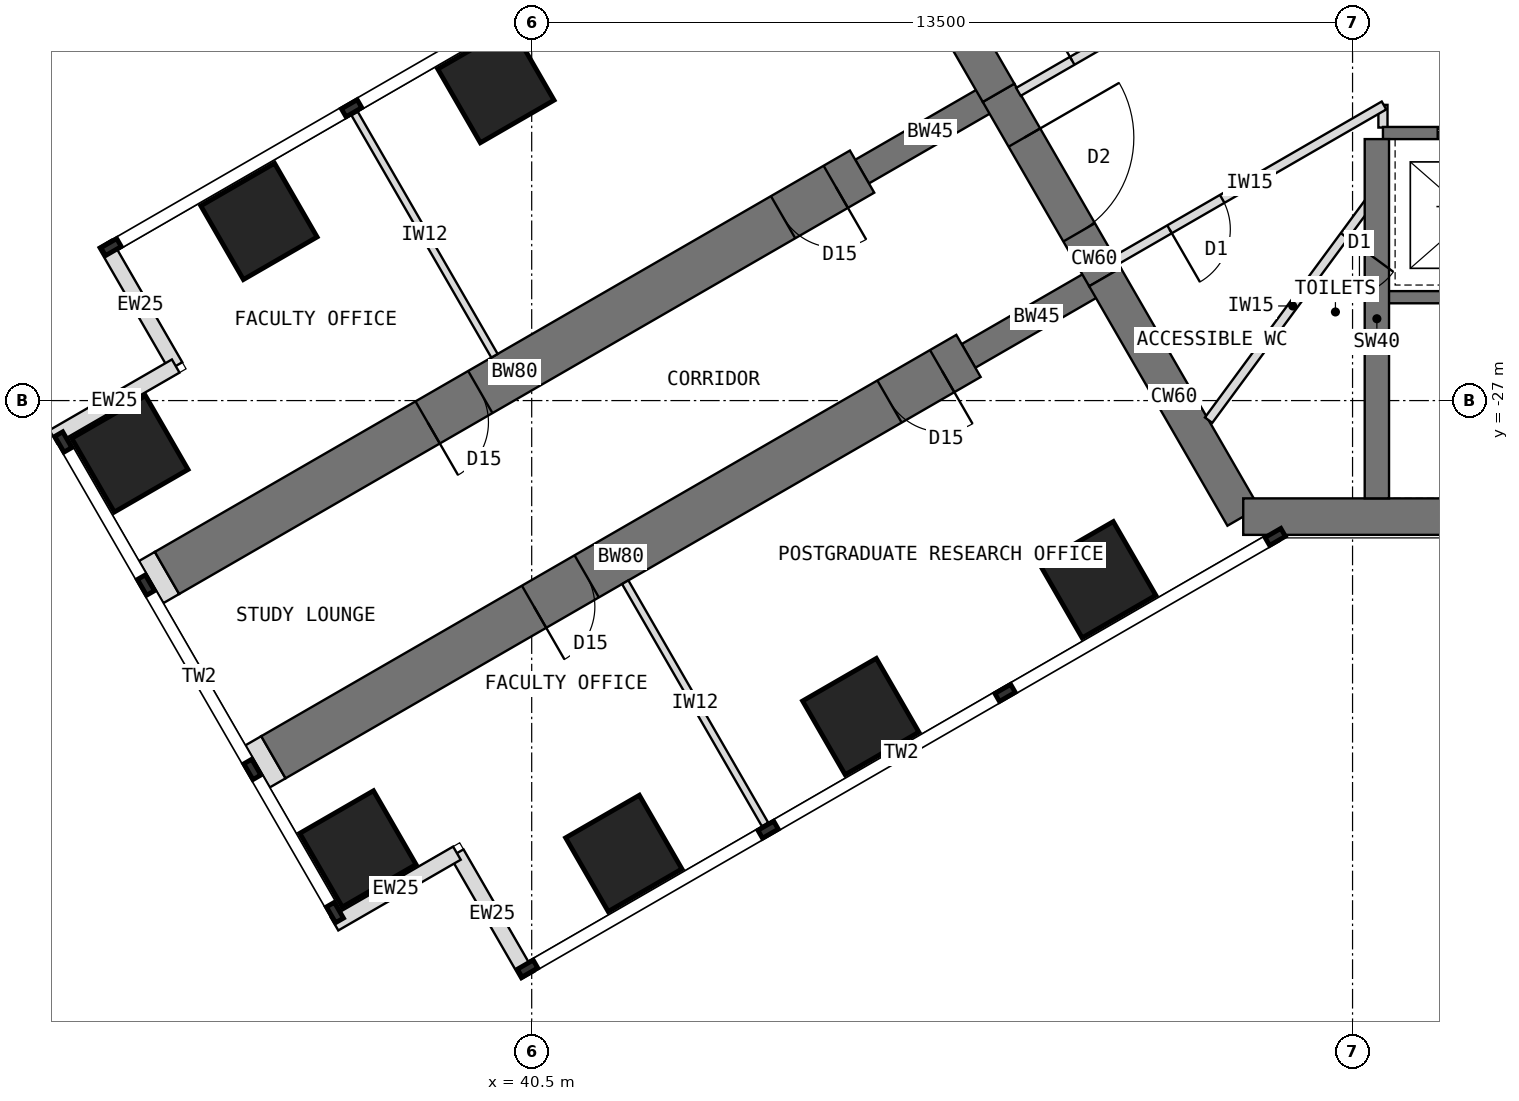
"""IFC4 building model, lengths in metres.
Left out: names, types, materials, properties, quantities, classifications, styles, units other than length and angle.
Written with IfcOpenShell. Run it as: python <this file> out.ifc"""

import sys

from ifc_helpers import new_model, si_unit, direction, frame, frame_2d, origin, origin_2d, place, context, subcontext, project, spatial, rectangle, extrude, element, fill, save


model = new_model("IFC4")
c1 = context("Model", 3, precision=1e-05, world=origin(), true_north=direction((0.0, 1.0)))
c2 = subcontext(c1, "Body", "Model", "MODEL_VIEW")
j1 = project(units=[si_unit("LENGTHUNIT", "METRE"), si_unit("PLANEANGLEUNIT", "RADIAN")], contexts=[c1])
p1 = place(None, origin())
s1 = spatial("IfcSite", under=j1, at=p1, CompositionType="ELEMENT")
p2 = place(p1, origin())
s2 = spatial("IfcBuilding", under=s1, at=p2, CompositionType="ELEMENT")
p3 = place(p2, frame((0.0, 0.0, 97.5)))
s3 = spatial("IfcBuildingStorey", under=s2, at=p3, CompositionType="ELEMENT", Elevation=97.5)
p4 = place(p3, frame((45.904, -18.0, 0.0), z_axis=(0.0, 0.0, 1.0), x_axis=(0.500024481964, -0.866011268655, 0.0)))
e1 = element("IfcWall", 1, at=p4, inside=s3, PredefinedType="SHEAR", context=c2, shape_type="SweptSolid", body=[
    extrude(rectangle(XDim=4.548, YDim=0.6, at=frame_2d((2.274, 0.0))), origin(), (0.0, 0.0, 1.0), 4.0),
])
p5 = place(p3, frame((48.178, -21.939, 0.0), z_axis=(0.0, 0.0, 1.0), x_axis=(0.500010275428, -0.866019471182, 0.0)))
e2 = element("IfcWall", 2, at=p5, inside=s3, PredefinedType="SHEAR", context=c2, shape_type="SweptSolid", body=[
    extrude(rectangle(XDim=3.5, YDim=0.6, at=frame_2d((1.75, 0.0))), origin(), (0.0, 0.0, 1.0), 4.0),
])
p6 = place(p5, frame((0.85, 0.0, 0.0)))
e3 = element("IfcOpeningElement", 3, at=p6, cuts=e2, PredefinedType="OPENING", context=c2, shape_type="SweptSolid", body=[
    extrude(rectangle(XDim=1.8, YDim=2.1, at=frame_2d((0.9, 1.05))), frame((0.0, 0.31, 0.0), z_axis=(0.0, -1.0, 0.0), x_axis=(1.0, 0.0, 0.0)), (0.0, 0.0, 1.0), 0.62),
])
p7 = place(p3, frame((49.928, -24.97, 0.0), z_axis=(0.0, 0.0, 1.0), x_axis=(0.499984222037, -0.866034513004, 0.0)))
e4 = element("IfcWall", 4, at=p7, inside=s3, PredefinedType="SHEAR", context=c2, shape_type="SweptSolid", body=[
    extrude(rectangle(XDim=4.548, YDim=0.6, at=frame_2d((2.274, 0.0))), origin(), (0.0, 0.0, 1.0), 4.0),
])
p8 = place(p3, frame((52.202, -28.908, 0.0), z_axis=(0.0, 0.0, 1.0), x_axis=(1.0, 0.0, 0.0)))
e5 = element("IfcWall", 5, at=p8, inside=s3, PredefinedType="SHEAR", context=c2, shape_type="SweptSolid", body=[
    extrude(rectangle(XDim=12.596, YDim=0.6, at=frame_2d((6.298, 0.0))), origin(), (0.0, 0.0, 1.0), 4.0),
])
p9 = place(p3, frame((49.928, -24.97, 0.0), z_axis=(0.0, 0.0, 1.0), x_axis=(-0.866031863473, -0.499988811324, 0.0)))
e6 = element("IfcWall", 6, at=p9, inside=s3, PredefinedType="SHEAR", context=c2, shape_type="SweptSolid", body=[
    extrude(rectangle(XDim=2.592, YDim=0.45, at=frame_2d((1.296, 0.0))), origin(), (0.0, 0.0, 1.0), 4.0),
])
p10 = place(p3, frame((47.684, -26.266, 0.0), z_axis=(0.0, 0.0, 1.0), x_axis=(-0.866027579429, -0.499996231654, 0.0)))
e7 = element("IfcWall", 7, at=p10, inside=s3, PredefinedType="SHEAR", context=c2, shape_type="SweptSolid", body=[
    extrude(rectangle(XDim=13.2, YDim=0.8, at=frame_2d((6.6, 0.0))), origin(), (0.0, 0.0, 1.0), 4.0),
])
p11 = place(p10, frame((0.5, 0.0, 0.0)))
e8 = element("IfcOpeningElement", 8, at=p11, cuts=e7, PredefinedType="OPENING", context=c2, shape_type="SweptSolid", body=[
    extrude(rectangle(XDim=1.0, YDim=2.1, at=frame_2d((0.5, 1.05))), frame((0.0, 0.41, 0.0), z_axis=(0.0, -1.0, 0.0), x_axis=(1.0, 0.0, 0.0)), (0.0, 0.0, 1.0), 0.82),
])
p12 = place(p10, frame((7.25, 0.0, 0.0)))
e9 = element("IfcOpeningElement", 9, at=p12, cuts=e7, PredefinedType="OPENING", context=c2, shape_type="SweptSolid", body=[
    extrude(rectangle(XDim=1.0, YDim=2.1, at=frame_2d((0.5, 1.05))), frame((0.0, 0.41, 0.0), z_axis=(0.0, -1.0, 0.0), x_axis=(1.0, 0.0, 0.0)), (0.0, 0.0, 1.0), 0.82),
])
p13 = place(p3, frame((48.178, -21.939, 0.0), z_axis=(0.0, 0.0, 1.0), x_axis=(-0.866072649678, -0.499918158782, 0.0)))
e10 = element("IfcWall", 10, at=p13, inside=s3, PredefinedType="SHEAR", context=c2, shape_type="SweptSolid", body=[
    extrude(rectangle(XDim=2.592, YDim=0.45, at=frame_2d((1.296, 0.0))), origin(), (0.0, 0.0, 1.0), 4.0),
])
p14 = place(p3, frame((45.934, -23.234, 0.0), z_axis=(0.0, 0.0, 1.0), x_axis=(-0.866019570528, -0.500010103361, 0.0)))
e11 = element("IfcWall", 11, at=p14, inside=s3, PredefinedType="SHEAR", context=c2, shape_type="SweptSolid", body=[
    extrude(rectangle(XDim=13.2, YDim=0.8, at=frame_2d((6.6, 0.0))), origin(), (0.0, 0.0, 1.0), 4.0),
])
p15 = place(p14, frame((0.5, 0.0, 0.0)))
e12 = element("IfcOpeningElement", 12, at=p15, cuts=e11, PredefinedType="OPENING", context=c2, shape_type="SweptSolid", body=[
    extrude(rectangle(XDim=1.0, YDim=2.1, at=frame_2d((0.5, 1.05))), frame((0.0, 0.41, 0.0), z_axis=(0.0, -1.0, 0.0), x_axis=(1.0, 0.0, 0.0)), (0.0, 0.0, 1.0), 0.82),
])
p16 = place(p14, frame((7.25, 0.0, 0.0)))
e13 = element("IfcOpeningElement", 13, at=p16, cuts=e11, PredefinedType="OPENING", context=c2, shape_type="SweptSolid", body=[
    extrude(rectangle(XDim=1.0, YDim=2.1, at=frame_2d((0.5, 1.05))), frame((0.0, 0.41, 0.0), z_axis=(0.0, -1.0, 0.0), x_axis=(1.0, 0.0, 0.0)), (0.0, 0.0, 1.0), 0.82),
])
for number, where, z_axis, x_axis in (
    (14, (49.809, -29.946, 0.0), (0.0, 0.0, 1.0), (0.866, 0.5, 0.0)),
    (15, (45.912, -32.196, 0.0), (0.0, 0.0, 1.0), (0.866, 0.5, 0.0)),
    (16, (39.912, -21.804, 0.0), (0.0, 0.0, 1.0), (0.866, 0.5, 0.0)),
    (17, (42.014, -34.446, 0.0), (0.0, 0.0, 1.0), (0.866, 0.5, 0.0)),
    (18, (36.014, -24.054, 0.0), (0.0, 0.0, 1.0), (0.866, 0.5, 0.0)),
    (19, (37.642, -34.373, 0.0), (0.0, 0.0, 1.0), (0.866, 0.5, 0.0)),
    (20, (33.892, -27.877, 0.0), (0.0, 0.0, 1.0), (0.866, 0.5, 0.0)),
):
    element("IfcColumn", number, at=place(p3, frame(where, z_axis=z_axis, x_axis=x_axis)), inside=s3, PredefinedType="COLUMN", context=c2, shape_type="SweptSolid", body=[
        extrude(rectangle(XDim=1.4, YDim=1.4, at=origin_2d()), origin(), (0.0, 0.0, 1.0), 4.0),
    ])
for number, where, z_axis, x_axis in (
    (21, (40.433, -36.456, 0.0), (0.0, 0.0, 1.0), (-0.5, 0.866, 0.0)),
    (22, (39.27, -34.443, 0.0), (0.0, 0.0, 1.0), (-0.866, -0.5, 0.0)),
    (23, (33.483, -24.419, 0.0), (0.0, 0.0, 1.0), (0.5, -0.866, 0.0)),
    (24, (34.645, -26.432, 0.0), (0.0, 0.0, 1.0), (-0.866, -0.5, 0.0)),
):
    element("IfcWall", number, at=place(p3, frame(where, z_axis=z_axis, x_axis=x_axis)), inside=s3, PredefinedType="STANDARD", context=c2, shape_type="SweptSolid", body=[
        extrude(rectangle(XDim=2.325, YDim=0.25, at=frame_2d((1.163, 0.0))), origin(), (0.0, 0.0, 1.0), 3.8),
    ])
p17 = place(p3, frame((36.252, -32.865, 0.0), z_axis=(0.0, 0.0, 1.0), x_axis=(-0.865778900179, -0.500426713919, 0.0)))
e25 = element("IfcWall", 25, at=p17, inside=s3, PredefinedType="PARTITIONING", context=c2, shape_type="SweptSolid", body=[
    extrude(rectangle(XDim=0.3, YDim=0.8, at=frame_2d((0.15, 0.0))), origin(), (0.0, 0.0, 1.0), 3.8),
])
p18 = place(p3, frame((34.502, -29.834, 0.0), z_axis=(0.0, 0.0, 1.0), x_axis=(-0.866131372301, -0.499816412211, 0.0)))
e26 = element("IfcWall", 26, at=p18, inside=s3, PredefinedType="PARTITIONING", context=c2, shape_type="SweptSolid", body=[
    extrude(rectangle(XDim=0.3, YDim=0.8, at=frame_2d((0.15, 0.0))), origin(), (0.0, 0.0, 1.0), 3.8),
])
p19 = place(p3, frame((54.5, -22.6, 0.0), z_axis=(0.0, 0.0, 1.0), x_axis=(1.0, 0.0, 0.0)))
e27 = element("IfcWall", 27, at=p19, inside=s3, PredefinedType="SHEAR", context=c2, shape_type="SweptSolid", body=[
    extrude(rectangle(XDim=8.0, YDim=0.2, at=frame_2d((4.0, 0.0))), origin(), (0.0, 0.0, 1.0), 4.0),
])
p20 = place(p19, frame((6.3, 0.0, 0.0)))
e28 = element("IfcOpeningElement", 28, at=p20, cuts=e27, PredefinedType="OPENING", context=c2, shape_type="SweptSolid", body=[
    extrude(rectangle(XDim=1.2, YDim=2.1, at=frame_2d((0.6, 1.05))), frame((0.0, 0.11, 0.0), z_axis=(0.0, -1.0, 0.0), x_axis=(1.0, 0.0, 0.0)), (0.0, 0.0, 1.0), 0.22),
])
p21 = place(p19, frame((0.9, 0.0, 0.0)))
e29 = element("IfcOpeningElement", 29, at=p21, cuts=e27, PredefinedType="OPENING", context=c2, shape_type="SweptSolid", body=[
    extrude(rectangle(XDim=1.1, YDim=2.2, at=frame_2d((0.55, 1.1))), frame((0.0, 0.11, 0.0), z_axis=(0.0, -1.0, 0.0), x_axis=(1.0, 0.0, 0.0)), (0.0, 0.0, 1.0), 0.22),
])
p22 = place(p3, frame((54.5, -25.3, 0.0), z_axis=(0.0, 0.0, 1.0), x_axis=(1.0, 0.0, 0.0)))
e30 = element("IfcWall", 30, at=p22, inside=s3, PredefinedType="SHEAR", context=c2, shape_type="SweptSolid", body=[
    extrude(rectangle(XDim=8.0, YDim=0.2, at=frame_2d((4.0, 0.0))), origin(), (0.0, 0.0, 1.0), 4.0),
])
p23 = place(p22, frame((6.7, 0.0, 0.0)))
e31 = element("IfcOpeningElement", 31, at=p23, cuts=e30, PredefinedType="OPENING", context=c2, shape_type="SweptSolid", body=[
    extrude(rectangle(XDim=1.1, YDim=2.1, at=frame_2d((0.55, 1.05))), frame((0.0, 0.11, 0.0), z_axis=(0.0, -1.0, 0.0), x_axis=(1.0, 0.0, 0.0)), (0.0, 0.0, 1.0), 0.22),
])
p24 = place(p3, frame((54.4, -22.7, 0.0), z_axis=(0.0, 0.0, 1.0), x_axis=(0.0, -1.0, 0.0)))
e32 = element("IfcWall", 32, at=p24, inside=s3, PredefinedType="SHEAR", context=c2, shape_type="SweptSolid", body=[
    extrude(rectangle(XDim=5.908, YDim=0.4, at=frame_2d((2.954, 0.0))), origin(), (0.0, 0.0, 1.0), 4.0),
])
for number, where, z_axis, x_axis in (
    (33, (42.038, -29.987, 0.0), (0.0, 0.0, 1.0), (0.5, -0.866, 0.0)),
    (34, (39.888, -26.263, 0.0), (0.0, 0.0, 1.0), (-0.5, 0.866, 0.0)),
):
    element("IfcWall", number, at=place(p3, frame(where, z_axis=z_axis, x_axis=x_axis)), inside=s3, PredefinedType="PARTITIONING", context=c2, shape_type="SweptSolid", body=[
        extrude(rectangle(XDim=4.6, YDim=0.12, at=frame_2d((2.3, 0.0))), origin(), (0.0, 0.0, 1.0), 3.8),
    ])
p25 = place(p3, frame((54.5, -22.51, 0.0), z_axis=(0.0, 0.0, 1.0), x_axis=(0.0, 1.0, 0.0)))
e35 = element("IfcWall", 35, at=p25, inside=s3, PredefinedType="PARTITIONING", context=c2, shape_type="SweptSolid", body=[
    extrude(rectangle(XDim=0.373, YDim=0.15, at=frame_2d((0.187, 0.0))), origin(), (0.0, 0.0, 1.0), 3.8),
])
p26 = place(p3, frame((54.517, -22.147, 0.0), z_axis=(0.0, 0.0, 1.0), x_axis=(-0.866029209911, -0.499993407537, 0.0)))
e36 = element("IfcWall", 36, at=p26, inside=s3, PredefinedType="PARTITIONING", context=c2, shape_type="SweptSolid", body=[
    extrude(rectangle(XDim=5.096, YDim=0.15, at=frame_2d((2.548, 0.0))), origin(), (0.0, 0.0, 1.0), 3.8),
])
p27 = place(p26, frame((3.073, 0.0, 0.0)))
e37 = element("IfcOpeningElement", 37, at=p27, cuts=e36, PredefinedType="OPENING", context=c2, shape_type="SweptSolid", body=[
    extrude(rectangle(XDim=1.0, YDim=2.1, at=frame_2d((0.5, 1.05))), frame((0.0, 0.085, 0.0), z_axis=(0.0, -1.0, 0.0), x_axis=(1.0, 0.0, 0.0)), (0.0, 0.0, 1.0), 0.17),
])
p28 = place(p3, frame((48.504, -21.924, 0.0), z_axis=(0.0, 0.0, 1.0), x_axis=(0.865996484538, 0.500050086259, 0.0)))
e38 = element("IfcWall", 38, at=p28, inside=s3, PredefinedType="PARTITIONING", context=c2, shape_type="SweptSolid", body=[
    extrude(rectangle(XDim=5.096, YDim=0.15, at=frame_2d((2.548, 0.0))), origin(), (0.0, 0.0, 1.0), 3.8),
])
p29 = place(p28, frame((1.023, 0.0, 0.0)))
e39 = element("IfcOpeningElement", 39, at=p29, cuts=e38, PredefinedType="OPENING", context=c2, shape_type="SweptSolid", body=[
    extrude(rectangle(XDim=1.0, YDim=2.1, at=frame_2d((0.5, 1.05))), frame((0.0, 0.085, 0.0), z_axis=(0.0, -1.0, 0.0), x_axis=(1.0, 0.0, 0.0)), (0.0, 0.0, 1.0), 0.17),
])
p30 = place(p3, frame((54.4, -23.566, 0.0), z_axis=(0.0, 0.0, 1.0), x_axis=(-0.59307051543, -0.805150522404, 0.0)))
e40 = element("IfcWall", 40, at=p30, inside=s3, PredefinedType="PARTITIONING", context=c2, shape_type="SweptSolid", body=[
    extrude(rectangle(XDim=4.666, YDim=0.15, at=frame_2d((2.333, 0.0))), origin(), (0.0, 0.0, 1.0), 3.8),
])
p31 = place(p30, frame((0.9, 0.0, 0.0)))
e41 = element("IfcOpeningElement", 41, at=p31, cuts=e40, PredefinedType="OPENING", context=c2, shape_type="SweptSolid", body=[
    extrude(rectangle(XDim=1.0, YDim=2.1, at=frame_2d((0.5, 1.05))), frame((0.0, 0.085, 0.0), z_axis=(0.0, -1.0, 0.0), x_axis=(1.0, 0.0, 0.0)), (0.0, 0.0, 1.0), 0.17),
])
p32 = place(p21, origin())
e42 = element("IfcDoor", 42, at=p32, inside=s3, OperationType="DOUBLE_DOOR_SLIDING", PredefinedType="DOOR", context=c2, shape_type="SweptSolid", body=[
    extrude(rectangle(XDim=1.1, YDim=2.2, at=frame_2d((0.55, 1.1))), frame((0.0, 0.025, 0.0), z_axis=(0.0, -1.0, 0.0), x_axis=(1.0, 0.0, 0.0)), (0.0, 0.0, 1.0), 0.05),
])
fill(e29, e42)
p33 = place(p6, origin())
e43 = element("IfcDoor", 43, at=p33, inside=s3, OperationType="DOUBLE_DOOR_DOUBLE_SWING", PredefinedType="DOOR", context=c2, shape_type="SweptSolid", body=[
    extrude(rectangle(XDim=1.72, YDim=2.06, at=frame_2d((0.9, 1.03))), frame((0.0, 0.025, 0.0), z_axis=(0.0, -1.0, 0.0), x_axis=(1.0, 0.0, 0.0)), (0.0, 0.0, 1.0), 0.05),
    extrude(rectangle(XDim=0.04, YDim=2.1, at=frame_2d((0.02, 1.05))), frame((0.0, 0.3, 0.0), z_axis=(0.0, -1.0, 0.0), x_axis=(1.0, 0.0, 0.0)), (0.0, 0.0, 1.0), 0.6),
    extrude(rectangle(XDim=0.04, YDim=2.1, at=frame_2d((1.78, 1.05))), frame((0.0, 0.3, 0.0), z_axis=(0.0, -1.0, 0.0), x_axis=(1.0, 0.0, 0.0)), (0.0, 0.0, 1.0), 0.6),
    extrude(rectangle(XDim=1.72, YDim=0.04, at=frame_2d((0.9, 2.08))), frame((0.0, 0.3, 0.0), z_axis=(0.0, -1.0, 0.0), x_axis=(1.0, 0.0, 0.0)), (0.0, 0.0, 1.0), 0.6),
])
fill(e3, e43)
p34 = place(p29, origin())
e44 = element("IfcDoor", 44, at=p34, inside=s3, OperationType="SINGLE_SWING_LEFT", PredefinedType="DOOR", context=c2, shape_type="SweptSolid", body=[
    extrude(rectangle(XDim=1.0, YDim=2.1, at=frame_2d((0.5, 1.05))), frame((0.0, 0.025, 0.0), z_axis=(0.0, -1.0, 0.0), x_axis=(1.0, 0.0, 0.0)), (0.0, 0.0, 1.0), 0.05),
])
fill(e39, e44)
p35 = place(p27, origin())
e45 = element("IfcDoor", 45, at=p35, inside=s3, OperationType="SINGLE_SWING_RIGHT", PredefinedType="DOOR", context=c2, shape_type="SweptSolid", body=[
    extrude(rectangle(XDim=1.0, YDim=2.1, at=frame_2d((0.5, 1.05))), frame((0.0, 0.025, 0.0), z_axis=(0.0, -1.0, 0.0), x_axis=(1.0, 0.0, 0.0)), (0.0, 0.0, 1.0), 0.05),
])
fill(e37, e45)
p36 = place(p31, origin())
e46 = element("IfcDoor", 46, at=p36, inside=s3, OperationType="SINGLE_SWING_LEFT", PredefinedType="DOOR", context=c2, shape_type="SweptSolid", body=[
    extrude(rectangle(XDim=1.0, YDim=2.1, at=frame_2d((0.5, 1.05))), frame((0.0, 0.025, 0.0), z_axis=(0.0, -1.0, 0.0), x_axis=(1.0, 0.0, 0.0)), (0.0, 0.0, 1.0), 0.05),
])
fill(e41, e46)
p37 = place(p11, origin())
e47 = element("IfcDoor", 47, at=p37, inside=s3, OperationType="SINGLE_SWING_LEFT", PredefinedType="DOOR", context=c2, shape_type="SweptSolid", body=[
    extrude(rectangle(XDim=0.92, YDim=2.06, at=frame_2d((0.5, 1.03))), frame((0.0, 0.025, 0.0), z_axis=(0.0, -1.0, 0.0), x_axis=(1.0, 0.0, 0.0)), (0.0, 0.0, 1.0), 0.05),
    extrude(rectangle(XDim=0.04, YDim=2.1, at=frame_2d((0.02, 1.05))), frame((0.0, 0.4, 0.0), z_axis=(0.0, -1.0, 0.0), x_axis=(1.0, 0.0, 0.0)), (0.0, 0.0, 1.0), 0.8),
    extrude(rectangle(XDim=0.04, YDim=2.1, at=frame_2d((0.98, 1.05))), frame((0.0, 0.4, 0.0), z_axis=(0.0, -1.0, 0.0), x_axis=(1.0, 0.0, 0.0)), (0.0, 0.0, 1.0), 0.8),
    extrude(rectangle(XDim=0.92, YDim=0.04, at=frame_2d((0.5, 2.08))), frame((0.0, 0.4, 0.0), z_axis=(0.0, -1.0, 0.0), x_axis=(1.0, 0.0, 0.0)), (0.0, 0.0, 1.0), 0.8),
])
fill(e8, e47)
p38 = place(p12, origin())
e48 = element("IfcDoor", 48, at=p38, inside=s3, OperationType="SINGLE_SWING_RIGHT", PredefinedType="DOOR", context=c2, shape_type="SweptSolid", body=[
    extrude(rectangle(XDim=0.92, YDim=2.06, at=frame_2d((0.5, 1.03))), frame((0.0, 0.025, 0.0), z_axis=(0.0, -1.0, 0.0), x_axis=(1.0, 0.0, 0.0)), (0.0, 0.0, 1.0), 0.05),
    extrude(rectangle(XDim=0.04, YDim=2.1, at=frame_2d((0.02, 1.05))), frame((0.0, 0.4, 0.0), z_axis=(0.0, -1.0, 0.0), x_axis=(1.0, 0.0, 0.0)), (0.0, 0.0, 1.0), 0.8),
    extrude(rectangle(XDim=0.04, YDim=2.1, at=frame_2d((0.98, 1.05))), frame((0.0, 0.4, 0.0), z_axis=(0.0, -1.0, 0.0), x_axis=(1.0, 0.0, 0.0)), (0.0, 0.0, 1.0), 0.8),
    extrude(rectangle(XDim=0.92, YDim=0.04, at=frame_2d((0.5, 2.08))), frame((0.0, 0.4, 0.0), z_axis=(0.0, -1.0, 0.0), x_axis=(1.0, 0.0, 0.0)), (0.0, 0.0, 1.0), 0.8),
])
fill(e9, e48)
p39 = place(p15, origin())
e49 = element("IfcDoor", 49, at=p39, inside=s3, OperationType="SINGLE_SWING_LEFT", PredefinedType="DOOR", context=c2, shape_type="SweptSolid", body=[
    extrude(rectangle(XDim=0.92, YDim=2.06, at=frame_2d((0.5, 1.03))), frame((0.0, 0.025, 0.0), z_axis=(0.0, -1.0, 0.0), x_axis=(1.0, 0.0, 0.0)), (0.0, 0.0, 1.0), 0.05),
    extrude(rectangle(XDim=0.04, YDim=2.1, at=frame_2d((0.02, 1.05))), frame((0.0, 0.4, 0.0), z_axis=(0.0, -1.0, 0.0), x_axis=(1.0, 0.0, 0.0)), (0.0, 0.0, 1.0), 0.8),
    extrude(rectangle(XDim=0.04, YDim=2.1, at=frame_2d((0.98, 1.05))), frame((0.0, 0.4, 0.0), z_axis=(0.0, -1.0, 0.0), x_axis=(1.0, 0.0, 0.0)), (0.0, 0.0, 1.0), 0.8),
    extrude(rectangle(XDim=0.92, YDim=0.04, at=frame_2d((0.5, 2.08))), frame((0.0, 0.4, 0.0), z_axis=(0.0, -1.0, 0.0), x_axis=(1.0, 0.0, 0.0)), (0.0, 0.0, 1.0), 0.8),
])
fill(e12, e49)
p40 = place(p16, origin())
e50 = element("IfcDoor", 50, at=p40, inside=s3, OperationType="SINGLE_SWING_RIGHT", PredefinedType="DOOR", context=c2, shape_type="SweptSolid", body=[
    extrude(rectangle(XDim=0.92, YDim=2.06, at=frame_2d((0.5, 1.03))), frame((0.0, 0.025, 0.0), z_axis=(0.0, -1.0, 0.0), x_axis=(1.0, 0.0, 0.0)), (0.0, 0.0, 1.0), 0.05),
    extrude(rectangle(XDim=0.04, YDim=2.1, at=frame_2d((0.02, 1.05))), frame((0.0, 0.4, 0.0), z_axis=(0.0, -1.0, 0.0), x_axis=(1.0, 0.0, 0.0)), (0.0, 0.0, 1.0), 0.8),
    extrude(rectangle(XDim=0.04, YDim=2.1, at=frame_2d((0.98, 1.05))), frame((0.0, 0.4, 0.0), z_axis=(0.0, -1.0, 0.0), x_axis=(1.0, 0.0, 0.0)), (0.0, 0.0, 1.0), 0.8),
    extrude(rectangle(XDim=0.92, YDim=0.04, at=frame_2d((0.5, 2.08))), frame((0.0, 0.4, 0.0), z_axis=(0.0, -1.0, 0.0), x_axis=(1.0, 0.0, 0.0)), (0.0, 0.0, 1.0), 0.8),
])
fill(e13, e50)
save(model, sys.argv[1])
